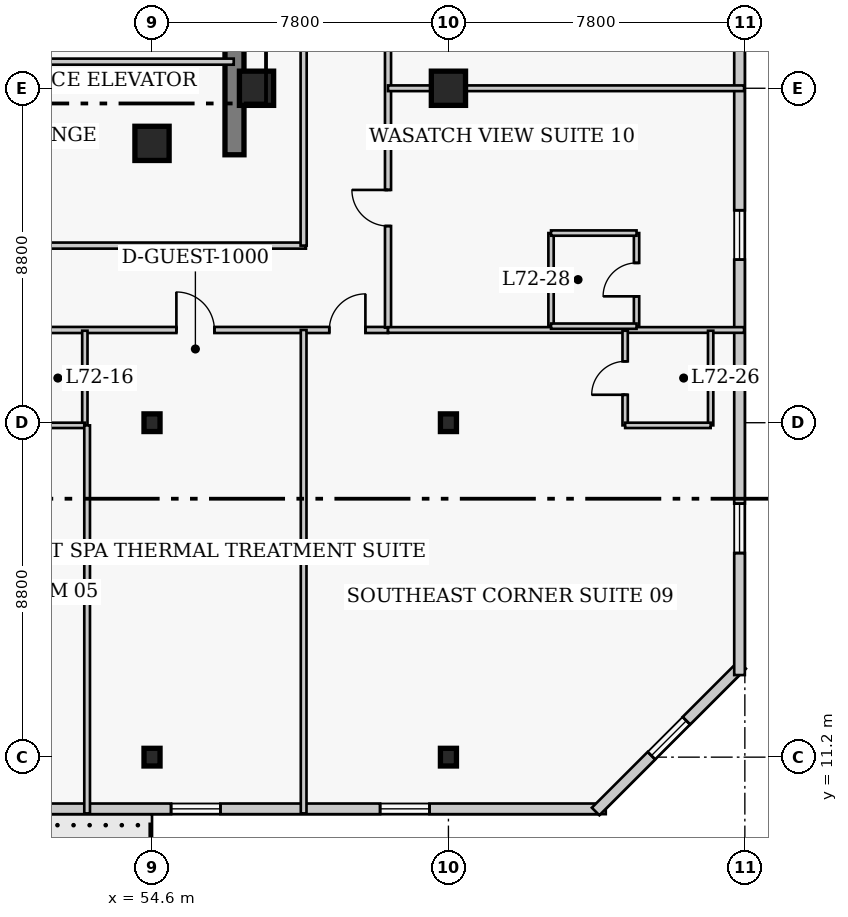
"""IFC4 building model, lengths in metres.
Left out: names, types, materials, properties, quantities, classifications, styles, units other than length and angle.
Written with IfcOpenShell. Run it as: python <this file> out.ifc"""

import sys

from ifc_helpers import new_model, si_unit, direction, frame, frame_2d, origin, origin_2d, place, context, subcontext, project, spatial, rectangle, i_section, extrude, element, fill, save


model = new_model("IFC4")
c1 = context("Model", 3, precision=1e-05, world=origin(), true_north=direction((0.0, 1.0)))
c2 = subcontext(c1, "Body", "Model", "MODEL_VIEW")
j1 = project(units=[si_unit("LENGTHUNIT", "METRE"), si_unit("PLANEANGLEUNIT", "RADIAN")], contexts=[c1])
p1 = place(None, origin())
s1 = spatial("IfcSite", under=j1, at=p1, CompositionType="ELEMENT")
p2 = place(p1, origin())
s2 = spatial("IfcBuilding", under=s1, at=p2, CompositionType="ELEMENT")
p3 = place(p2, frame((0.0, 0.0, 289.4)))
s3 = spatial("IfcBuildingStorey", under=s2, at=p3, CompositionType="ELEMENT", Elevation=289.4)
p4 = place(p3, frame((56.77, 27.05, 0.0), z_axis=(0.0, 0.0, 1.0), x_axis=(0.0, 1.0, 0.0)))
e1 = element("IfcWall", 1, at=p4, inside=s3, PredefinedType="SHEAR", context=c2, shape_type="SweptSolid", body=[
    extrude(rectangle(XDim=13.52, YDim=0.5, at=frame_2d((6.76, 0.0))), origin(), (0.0, 0.0, 1.0), 4.0),
])
for number, where, z_axis, x_axis in (
    (2, (54.6, 11.2, 0.0), (0.0, 0.0, 1.0), (1.0, 0.0, 0.0)),
    (3, (54.6, 20.0, 0.0), (0.0, 0.0, 1.0), (1.0, 0.0, 0.0)),
    (4, (62.4, 11.2, 0.0), (0.0, 0.0, 1.0), (1.0, 0.0, 0.0)),
    (5, (62.4, 20.0, 0.0), (0.0, 0.0, 1.0), (1.0, 0.0, 0.0)),
):
    element("IfcColumn", number, at=place(p3, frame(where, z_axis=z_axis, x_axis=x_axis)), inside=s3, PredefinedType="COLUMN", context=c2, shape_type="SweptSolid", body=[
        extrude(i_section(OverallWidth=0.422, OverallDepth=0.465, WebThickness=0.045, FlangeThickness=0.073, FilletRadius=0.017, at=origin_2d()), origin(), (0.0, 0.0, 1.0), 4.0),
    ])
for number, where, z_axis, x_axis in (
    (6, (62.4, 28.8, 0.0), (0.0, 0.0, 1.0), (1.0, 0.0, 0.0)),
    (7, (57.35, 28.8, 0.0), (0.0, 0.0, 1.0), (1.0, 0.0, 0.0)),
    (8, (54.6, 27.35, 0.0), (0.0, 0.0, 1.0), (1.0, 0.0, 0.0)),
):
    element("IfcColumn", number, at=place(p3, frame(where, z_axis=z_axis, x_axis=x_axis)), inside=s3, PredefinedType="COLUMN", context=c2, shape_type="SweptSolid", body=[
        extrude(rectangle(XDim=0.9, YDim=0.9, at=origin_2d()), origin(), (0.0, 0.0, 1.0), 4.0),
    ])
p5 = place(p3, frame((41.71, 9.84, 0.0), z_axis=(0.0, 0.0, 1.0), x_axis=(1.0, 0.0, 0.0)))
e9 = element("IfcWall", 9, at=p5, inside=s3, PredefinedType="SOLIDWALL", context=c2, shape_type="SweptSolid", body=[
    extrude(rectangle(XDim=24.83, YDim=0.28, at=frame_2d((12.415, 0.0))), origin(), (0.0, 0.0, 1.0), 3.76),
])
p6 = place(p5, frame((8.29, 0.0, 0.0)))
e10 = element("IfcOpeningElement", 10, at=p6, cuts=e9, PredefinedType="OPENING", context=c2, shape_type="SweptSolid", body=[
    extrude(rectangle(XDim=1.4, YDim=2.15, at=frame_2d((0.7, 1.075))), frame((0.0, 0.15, 0.0), z_axis=(0.0, -1.0, 0.0), x_axis=(1.0, 0.0, 0.0)), (0.0, 0.0, 1.0), 0.3),
])
p7 = place(p5, frame((3.488, 0.0, 0.85)))
e11 = element("IfcOpeningElement", 11, at=p7, cuts=e9, PredefinedType="OPENING", context=c2, shape_type="SweptSolid", body=[
    extrude(rectangle(XDim=1.3, YDim=1.7, at=frame_2d((0.65, 0.85))), frame((0.0, 0.15, 0.0), z_axis=(0.0, -1.0, 0.0), x_axis=(1.0, 0.0, 0.0)), (0.0, 0.0, 1.0), 0.3),
])
p8 = place(p5, frame((18.892, 0.0, 0.85)))
e12 = element("IfcOpeningElement", 12, at=p8, cuts=e9, PredefinedType="OPENING", context=c2, shape_type="SweptSolid", body=[
    extrude(rectangle(XDim=1.3, YDim=1.7, at=frame_2d((0.65, 0.85))), frame((0.0, 0.15, 0.0), z_axis=(0.0, -1.0, 0.0), x_axis=(1.0, 0.0, 0.0)), (0.0, 0.0, 1.0), 0.3),
])
p9 = place(p5, frame((13.391, 0.0, 0.85)))
e13 = element("IfcOpeningElement", 13, at=p9, cuts=e9, PredefinedType="OPENING", context=c2, shape_type="SweptSolid", body=[
    extrude(rectangle(XDim=1.3, YDim=1.7, at=frame_2d((0.65, 0.85))), frame((0.0, 0.15, 0.0), z_axis=(0.0, -1.0, 0.0), x_axis=(1.0, 0.0, 0.0)), (0.0, 0.0, 1.0), 0.3),
])
p10 = place(p3, frame((66.273, 9.771, 0.0), z_axis=(0.0, 0.0, 1.0), x_axis=(0.707129162587, 0.707084399077, 0.0)))
e14 = element("IfcWall", 14, at=p10, inside=s3, PredefinedType="SOLIDWALL", context=c2, shape_type="SweptSolid", body=[
    extrude(rectangle(XDim=5.454, YDim=0.28, at=frame_2d((2.727, 0.0))), origin(), (0.0, 0.0, 1.0), 3.76),
])
p11 = place(p10, frame((2.077, 0.0, 0.85)))
e15 = element("IfcOpeningElement", 15, at=p11, cuts=e14, PredefinedType="OPENING", context=c2, shape_type="SweptSolid", body=[
    extrude(rectangle(XDim=1.3, YDim=1.7, at=frame_2d((0.65, 0.85))), frame((0.0, 0.15, 0.0), z_axis=(0.0, -1.0, 0.0), x_axis=(1.0, 0.0, 0.0)), (0.0, 0.0, 1.0), 0.3),
])
p12 = place(p3, frame((70.06, 13.36, 0.0), z_axis=(0.0, 0.0, 1.0), x_axis=(0.0, 1.0, 0.0)))
e16 = element("IfcWall", 16, at=p12, inside=s3, PredefinedType="SOLIDWALL", context=c2, shape_type="SweptSolid", body=[
    extrude(rectangle(XDim=30.88, YDim=0.28, at=frame_2d((15.44, 0.0))), origin(), (0.0, 0.0, 1.0), 3.76),
])
p13 = place(p12, frame((3.21, 0.0, 0.85)))
e17 = element("IfcOpeningElement", 17, at=p13, cuts=e16, PredefinedType="OPENING", context=c2, shape_type="SweptSolid", body=[
    extrude(rectangle(XDim=1.3, YDim=1.7, at=frame_2d((0.65, 0.85))), frame((0.0, 0.15, 0.0), z_axis=(0.0, -1.0, 0.0), x_axis=(1.0, 0.0, 0.0)), (0.0, 0.0, 1.0), 0.3),
])
p14 = place(p12, frame((10.93, 0.0, 0.85)))
e18 = element("IfcOpeningElement", 18, at=p14, cuts=e16, PredefinedType="OPENING", context=c2, shape_type="SweptSolid", body=[
    extrude(rectangle(XDim=1.3, YDim=1.7, at=frame_2d((0.65, 0.85))), frame((0.0, 0.15, 0.0), z_axis=(0.0, -1.0, 0.0), x_axis=(1.0, 0.0, 0.0)), (0.0, 0.0, 1.0), 0.3),
])
p15 = place(p12, frame((18.65, 0.0, 0.85)))
e19 = element("IfcOpeningElement", 19, at=p15, cuts=e16, PredefinedType="OPENING", context=c2, shape_type="SweptSolid", body=[
    extrude(rectangle(XDim=1.3, YDim=1.7, at=frame_2d((0.65, 0.85))), frame((0.0, 0.15, 0.0), z_axis=(0.0, -1.0, 0.0), x_axis=(1.0, 0.0, 0.0)), (0.0, 0.0, 1.0), 0.3),
])
p16 = place(p12, frame((26.37, 0.0, 0.85)))
e20 = element("IfcOpeningElement", 20, at=p16, cuts=e16, PredefinedType="OPENING", context=c2, shape_type="SweptSolid", body=[
    extrude(rectangle(XDim=1.3, YDim=1.7, at=frame_2d((0.65, 0.85))), frame((0.0, 0.15, 0.0), z_axis=(0.0, -1.0, 0.0), x_axis=(1.0, 0.0, 0.0)), (0.0, 0.0, 1.0), 0.3),
])
p17 = place(p3, frame((51.12, 29.5, 0.0), z_axis=(0.0, 0.0, 1.0), x_axis=(1.0, 0.0, 0.0)))
e21 = element("IfcWall", 21, at=p17, inside=s3, PredefinedType="PARTITIONING", context=c2, shape_type="SweptSolid", body=[
    extrude(rectangle(XDim=5.63, YDim=0.16, at=frame_2d((2.815, 0.0))), origin(), (0.0, 0.0, 1.0), 3.76),
])
p18 = place(p3, frame((35.85, 24.66, 0.0), z_axis=(0.0, 0.0, 1.0), x_axis=(1.0, 0.0, 0.0)))
e22 = element("IfcWall", 22, at=p18, inside=s3, PredefinedType="PARTITIONING", context=c2, shape_type="SweptSolid", body=[
    extrude(rectangle(XDim=22.8, YDim=0.16, at=frame_2d((11.4, 0.0))), origin(), (0.0, 0.0, 1.0), 3.76),
])
p19 = place(p18, frame((5.35, 0.0, 0.0)))
e23 = element("IfcOpeningElement", 23, at=p19, cuts=e22, PredefinedType="OPENING", context=c2, shape_type="SweptSolid", body=[
    extrude(rectangle(XDim=1.0, YDim=2.15, at=frame_2d((0.5, 1.075))), frame((0.0, 0.09, 0.0), z_axis=(0.0, -1.0, 0.0), x_axis=(1.0, 0.0, 0.0)), (0.0, 0.0, 1.0), 0.18),
])
p20 = place(p18, frame((12.85, 0.0, 0.0)))
e24 = element("IfcOpeningElement", 24, at=p20, cuts=e22, PredefinedType="OPENING", context=c2, shape_type="SweptSolid", body=[
    extrude(rectangle(XDim=1.0, YDim=2.15, at=frame_2d((0.5, 1.075))), frame((0.0, 0.09, 0.0), z_axis=(0.0, -1.0, 0.0), x_axis=(1.0, 0.0, 0.0)), (0.0, 0.0, 1.0), 0.18),
])
p21 = place(p3, frame((35.8, 22.44, 0.0), z_axis=(0.0, 0.0, 1.0), x_axis=(1.0, 0.0, 0.0)))
e25 = element("IfcWall", 25, at=p21, inside=s3, PredefinedType="PARTITIONING", context=c2, shape_type="SweptSolid", body=[
    extrude(rectangle(XDim=25.01, YDim=0.16, at=frame_2d((12.505, 0.0))), origin(), (0.0, 0.0, 1.0), 3.76),
])
p22 = place(p21, frame((0.924, 0.0, 0.0)))
e26 = element("IfcOpeningElement", 26, at=p22, cuts=e25, PredefinedType="OPENING", context=c2, shape_type="SweptSolid", body=[
    extrude(rectangle(XDim=0.95, YDim=2.1, at=frame_2d((0.475, 1.05))), frame((0.0, 0.09, 0.0), z_axis=(0.0, -1.0, 0.0), x_axis=(1.0, 0.0, 0.0)), (0.0, 0.0, 1.0), 0.18),
])
p23 = place(p21, frame((9.226, 0.0, 0.0)))
e27 = element("IfcOpeningElement", 27, at=p23, cuts=e25, PredefinedType="OPENING", context=c2, shape_type="SweptSolid", body=[
    extrude(rectangle(XDim=0.95, YDim=2.1, at=frame_2d((0.475, 1.05))), frame((0.0, 0.09, 0.0), z_axis=(0.0, -1.0, 0.0), x_axis=(1.0, 0.0, 0.0)), (0.0, 0.0, 1.0), 0.18),
])
p24 = place(p21, frame((12.614, 0.0, 0.0)))
e28 = element("IfcOpeningElement", 28, at=p24, cuts=e25, PredefinedType="OPENING", context=c2, shape_type="SweptSolid", body=[
    extrude(rectangle(XDim=0.95, YDim=2.1, at=frame_2d((0.475, 1.05))), frame((0.0, 0.09, 0.0), z_axis=(0.0, -1.0, 0.0), x_axis=(1.0, 0.0, 0.0)), (0.0, 0.0, 1.0), 0.18),
])
p25 = place(p21, frame((19.441, 0.0, 0.0)))
e29 = element("IfcOpeningElement", 29, at=p25, cuts=e25, PredefinedType="OPENING", context=c2, shape_type="SweptSolid", body=[
    extrude(rectangle(XDim=1.0, YDim=2.15, at=frame_2d((0.5, 1.075))), frame((0.0, 0.09, 0.0), z_axis=(0.0, -1.0, 0.0), x_axis=(1.0, 0.0, 0.0)), (0.0, 0.0, 1.0), 0.18),
])
p26 = place(p21, frame((23.465, 0.0, 0.0)))
e30 = element("IfcOpeningElement", 30, at=p26, cuts=e25, PredefinedType="OPENING", context=c2, shape_type="SweptSolid", body=[
    extrude(rectangle(XDim=0.95, YDim=2.1, at=frame_2d((0.475, 1.05))), frame((0.0, 0.09, 0.0), z_axis=(0.0, -1.0, 0.0), x_axis=(1.0, 0.0, 0.0)), (0.0, 0.0, 1.0), 0.18),
])
p27 = place(p3, frame((60.81, 22.5, 0.0), z_axis=(0.0, 0.0, 1.0), x_axis=(0.0, 1.0, 0.0)))
e31 = element("IfcWall", 31, at=p27, inside=s3, PredefinedType="PARTITIONING", context=c2, shape_type="SweptSolid", body=[
    extrude(rectangle(XDim=18.15, YDim=0.16, at=frame_2d((9.075, 0.0))), origin(), (0.0, 0.0, 1.0), 3.76),
])
p28 = place(p27, frame((2.675, 0.0, 0.0)))
e32 = element("IfcOpeningElement", 32, at=p28, cuts=e31, PredefinedType="OPENING", context=c2, shape_type="SweptSolid", body=[
    extrude(rectangle(XDim=0.95, YDim=2.1, at=frame_2d((0.475, 1.05))), frame((0.0, 0.09, 0.0), z_axis=(0.0, -1.0, 0.0), x_axis=(1.0, 0.0, 0.0)), (0.0, 0.0, 1.0), 0.18),
])
p29 = place(p27, frame((9.875, 0.0, 0.0)))
e33 = element("IfcOpeningElement", 33, at=p29, cuts=e31, PredefinedType="OPENING", context=c2, shape_type="SweptSolid", body=[
    extrude(rectangle(XDim=0.95, YDim=2.1, at=frame_2d((0.475, 1.05))), frame((0.0, 0.09, 0.0), z_axis=(0.0, -1.0, 0.0), x_axis=(1.0, 0.0, 0.0)), (0.0, 0.0, 1.0), 0.18),
])
p30 = place(p27, frame((16.71, 0.0, 0.0)))
e34 = element("IfcOpeningElement", 34, at=p30, cuts=e31, PredefinedType="OPENING", context=c2, shape_type="SweptSolid", body=[
    extrude(rectangle(XDim=1.0, YDim=2.15, at=frame_2d((0.5, 1.075))), frame((0.0, 0.09, 0.0), z_axis=(0.0, -1.0, 0.0), x_axis=(1.0, 0.0, 0.0)), (0.0, 0.0, 1.0), 0.18),
])
p31 = place(p3, frame((58.59, 24.66, 0.0), z_axis=(0.0, 0.0, 1.0), x_axis=(0.0, 1.0, 0.0)))
e35 = element("IfcWall", 35, at=p31, inside=s3, PredefinedType="PARTITIONING", context=c2, shape_type="SweptSolid", body=[
    extrude(rectangle(XDim=15.99, YDim=0.16, at=frame_2d((7.995, 0.0))), origin(), (0.0, 0.0, 1.0), 3.76),
])
p32 = place(p3, frame((52.833, 19.93, 0.0), z_axis=(0.0, 0.0, 1.0), x_axis=(0.0, 1.0, 0.0)))
e36 = element("IfcWall", 36, at=p32, inside=s3, PredefinedType="PLUMBINGWALL", context=c2, shape_type="SweptSolid", body=[
    extrude(rectangle(XDim=2.49, YDim=0.14, at=frame_2d((1.245, 0.0))), origin(), (0.0, 0.0, 1.0), 3.76),
])
p33 = place(p3, frame((50.583, 19.93, 0.0), z_axis=(0.0, 0.0, 1.0), x_axis=(1.0, 0.0, 0.0)))
e37 = element("IfcWall", 37, at=p33, inside=s3, PredefinedType="PLUMBINGWALL", context=c2, shape_type="SweptSolid", body=[
    extrude(rectangle(XDim=2.25, YDim=0.14, at=frame_2d((1.125, 0.0))), origin(), (0.0, 0.0, 1.0), 3.064),
])
p34 = place(p3, frame((52.893, 9.72, 0.0), z_axis=(0.0, 0.0, 1.0), x_axis=(0.0, 1.0, 0.0)))
e38 = element("IfcWall", 38, at=p34, inside=s3, PredefinedType="PARTITIONING", context=c2, shape_type="SweptSolid", body=[
    extrude(rectangle(XDim=10.21, YDim=0.15, at=frame_2d((5.105, 0.0))), origin(), (0.0, 0.0, 1.0), 3.76),
])
p35 = place(p3, frame((58.59, 9.72, 0.0), z_axis=(0.0, 0.0, 1.0), x_axis=(0.0, 1.0, 0.0)))
e39 = element("IfcWall", 39, at=p35, inside=s3, PredefinedType="PARTITIONING", context=c2, shape_type="SweptSolid", body=[
    extrude(rectangle(XDim=12.72, YDim=0.15, at=frame_2d((6.36, 0.0))), origin(), (0.0, 0.0, 1.0), 3.356),
])
p36 = place(p3, frame((60.81, 22.44, 0.0), z_axis=(0.0, 0.0, 1.0), x_axis=(1.0, 0.0, 0.0)))
e40 = element("IfcWall", 40, at=p36, inside=s3, PredefinedType="PARTITIONING", context=c2, shape_type="SweptSolid", body=[
    extrude(rectangle(XDim=9.37, YDim=0.15, at=frame_2d((4.685, 0.0))), origin(), (0.0, 0.0, 1.0), 3.76),
])
p37 = place(p3, frame((67.05, 19.93, 0.0), z_axis=(0.0, 0.0, 1.0), x_axis=(0.0, 1.0, 0.0)))
e41 = element("IfcWall", 41, at=p37, inside=s3, PredefinedType="PLUMBINGWALL", context=c2, shape_type="SweptSolid", body=[
    extrude(rectangle(XDim=2.49, YDim=0.14, at=frame_2d((1.245, 0.0))), origin(), (0.0, 0.0, 1.0), 3.76),
])
p38 = place(p37, frame((0.805, 0.0, 0.0)))
e42 = element("IfcOpeningElement", 42, at=p38, cuts=e41, PredefinedType="OPENING", context=c2, shape_type="SweptSolid", body=[
    extrude(rectangle(XDim=0.88, YDim=2.05, at=frame_2d((0.44, 1.025))), frame((0.0, 0.08, 0.0), z_axis=(0.0, -1.0, 0.0), x_axis=(1.0, 0.0, 0.0)), (0.0, 0.0, 1.0), 0.16),
])
p39 = place(p3, frame((69.3, 19.93, 0.0), z_axis=(0.0, 0.0, 1.0), x_axis=(0.0, 1.0, 0.0)))
e43 = element("IfcWall", 43, at=p39, inside=s3, PredefinedType="PLUMBINGWALL", context=c2, shape_type="SweptSolid", body=[
    extrude(rectangle(XDim=2.49, YDim=0.14, at=frame_2d((1.245, 0.0))), origin(), (0.0, 0.0, 1.0), 3.76),
])
p40 = place(p3, frame((67.05, 19.93, 0.0), z_axis=(0.0, 0.0, 1.0), x_axis=(1.0, 0.0, 0.0)))
e44 = element("IfcWall", 44, at=p40, inside=s3, PredefinedType="PLUMBINGWALL", context=c2, shape_type="SweptSolid", body=[
    extrude(rectangle(XDim=2.25, YDim=0.14, at=frame_2d((1.125, 0.0))), origin(), (0.0, 0.0, 1.0), 3.76),
])
p41 = place(p3, frame((65.1, 22.54, 0.0), z_axis=(0.0, 0.0, 1.0), x_axis=(0.0, 1.0, 0.0)))
e45 = element("IfcWall", 45, at=p41, inside=s3, PredefinedType="PLUMBINGWALL", context=c2, shape_type="SweptSolid", body=[
    extrude(rectangle(XDim=2.45, YDim=0.14, at=frame_2d((1.225, 0.0))), origin(), (0.0, 0.0, 1.0), 3.76),
])
p42 = place(p3, frame((67.35, 22.54, 0.0), z_axis=(0.0, 0.0, 1.0), x_axis=(0.0, 1.0, 0.0)))
e46 = element("IfcWall", 46, at=p42, inside=s3, PredefinedType="PLUMBINGWALL", context=c2, shape_type="SweptSolid", body=[
    extrude(rectangle(XDim=2.45, YDim=0.14, at=frame_2d((1.225, 0.0))), origin(), (0.0, 0.0, 1.0), 3.76),
])
p43 = place(p42, frame((0.785, 0.0, 0.0)))
e47 = element("IfcOpeningElement", 47, at=p43, cuts=e46, PredefinedType="OPENING", context=c2, shape_type="SweptSolid", body=[
    extrude(rectangle(XDim=0.88, YDim=2.05, at=frame_2d((0.44, 1.025))), frame((0.0, 0.08, 0.0), z_axis=(0.0, -1.0, 0.0), x_axis=(1.0, 0.0, 0.0)), (0.0, 0.0, 1.0), 0.16),
])
for number, where, z_axis, x_axis in (
    (48, (65.1, 22.54, 0.0), (0.0, 0.0, 1.0), (1.0, 0.0, 0.0)),
    (49, (65.1, 24.99, 0.0), (0.0, 0.0, 1.0), (1.0, 0.0, 0.0)),
):
    element("IfcWall", number, at=place(p3, frame(where, z_axis=z_axis, x_axis=x_axis)), inside=s3, PredefinedType="PLUMBINGWALL", context=c2, shape_type="SweptSolid", body=[
        extrude(rectangle(XDim=2.25, YDim=0.14, at=frame_2d((1.125, 0.0))), origin(), (0.0, 0.0, 1.0), 3.76),
    ])
p44 = place(p3, frame((60.81, 28.8, 0.0), z_axis=(0.0, 0.0, 1.0), x_axis=(1.0, 0.0, 0.0)))
e50 = element("IfcWall", 50, at=p44, inside=s3, PredefinedType="PARTITIONING", context=c2, shape_type="SweptSolid", body=[
    extrude(rectangle(XDim=9.37, YDim=0.15, at=frame_2d((4.685, 0.0))), origin(), (0.0, 0.0, 1.0), 3.064),
])
p45 = place(p8, origin())
e51 = element("IfcWindow", 51, at=p45, inside=s3, PartitioningType="SINGLE_PANEL", PredefinedType="WINDOW", context=c2, shape_type="SweptSolid", body=[
    extrude(rectangle(XDim=1.3, YDim=1.7, at=frame_2d((0.65, 0.85))), frame((0.0, 0.03, 0.0), z_axis=(0.0, -1.0, 0.0), x_axis=(1.0, 0.0, 0.0)), (0.0, 0.0, 1.0), 0.06),
])
fill(e12, e51)
p46 = place(p11, origin())
e52 = element("IfcWindow", 52, at=p46, inside=s3, PartitioningType="SINGLE_PANEL", PredefinedType="WINDOW", context=c2, shape_type="SweptSolid", body=[
    extrude(rectangle(XDim=1.3, YDim=1.7, at=frame_2d((0.65, 0.85))), frame((0.0, 0.03, 0.0), z_axis=(0.0, -1.0, 0.0), x_axis=(1.0, 0.0, 0.0)), (0.0, 0.0, 1.0), 0.06),
])
fill(e15, e52)
p47 = place(p13, origin())
e53 = element("IfcWindow", 53, at=p47, inside=s3, PartitioningType="SINGLE_PANEL", PredefinedType="WINDOW", context=c2, shape_type="SweptSolid", body=[
    extrude(rectangle(XDim=1.3, YDim=1.7, at=frame_2d((0.65, 0.85))), frame((0.0, 0.03, 0.0), z_axis=(0.0, -1.0, 0.0), x_axis=(1.0, 0.0, 0.0)), (0.0, 0.0, 1.0), 0.06),
])
fill(e17, e53)
p48 = place(p14, origin())
e54 = element("IfcWindow", 54, at=p48, inside=s3, PartitioningType="SINGLE_PANEL", PredefinedType="WINDOW", context=c2, shape_type="SweptSolid", body=[
    extrude(rectangle(XDim=1.3, YDim=1.7, at=frame_2d((0.65, 0.85))), frame((0.0, 0.03, 0.0), z_axis=(0.0, -1.0, 0.0), x_axis=(1.0, 0.0, 0.0)), (0.0, 0.0, 1.0), 0.06),
])
fill(e18, e54)
p49 = place(p9, origin())
e55 = element("IfcWindow", 55, at=p49, inside=s3, PartitioningType="SINGLE_PANEL", PredefinedType="WINDOW", context=c2, shape_type="SweptSolid", body=[
    extrude(rectangle(XDim=1.3, YDim=1.7, at=frame_2d((0.65, 0.85))), frame((0.0, 0.03, 0.0), z_axis=(0.0, -1.0, 0.0), x_axis=(1.0, 0.0, 0.0)), (0.0, 0.0, 1.0), 0.06),
])
fill(e13, e55)
p50 = place(p25, origin())
e56 = element("IfcDoor", 56, at=p50, inside=s3, OperationType="SINGLE_SWING_LEFT", PredefinedType="DOOR", context=c2, shape_type="SweptSolid", body=[
    extrude(rectangle(XDim=1.0, YDim=2.15, at=frame_2d((0.5, 1.075))), frame((0.0, 0.025, 0.0), z_axis=(0.0, -1.0, 0.0), x_axis=(1.0, 0.0, 0.0)), (0.0, 0.0, 1.0), 0.05),
])
fill(e29, e56)
p51 = place(p38, origin())
e57 = element("IfcDoor", 57, at=p51, inside=s3, OperationType="SINGLE_SWING_LEFT", PredefinedType="DOOR", context=c2, shape_type="SweptSolid", body=[
    extrude(rectangle(XDim=0.88, YDim=2.05, at=frame_2d((0.44, 1.025))), frame((0.0, 0.025, 0.0), z_axis=(0.0, -1.0, 0.0), x_axis=(1.0, 0.0, 0.0)), (0.0, 0.0, 1.0), 0.05),
])
fill(e42, e57)
p52 = place(p26, origin())
e58 = element("IfcDoor", 58, at=p52, inside=s3, OperationType="SINGLE_SWING_RIGHT", PredefinedType="DOOR", context=c2, shape_type="SweptSolid", body=[
    extrude(rectangle(XDim=0.95, YDim=2.1, at=frame_2d((0.475, 1.05))), frame((0.0, 0.025, 0.0), z_axis=(0.0, -1.0, 0.0), x_axis=(1.0, 0.0, 0.0)), (0.0, 0.0, 1.0), 0.05),
])
fill(e30, e58)
p53 = place(p43, origin())
e59 = element("IfcDoor", 59, at=p53, inside=s3, OperationType="SINGLE_SWING_LEFT", PredefinedType="DOOR", context=c2, shape_type="SweptSolid", body=[
    extrude(rectangle(XDim=0.88, YDim=2.05, at=frame_2d((0.44, 1.025))), frame((0.0, 0.025, 0.0), z_axis=(0.0, -1.0, 0.0), x_axis=(1.0, 0.0, 0.0)), (0.0, 0.0, 1.0), 0.05),
])
fill(e47, e59)
p54 = place(p28, origin())
e60 = element("IfcDoor", 60, at=p54, inside=s3, OperationType="SINGLE_SWING_RIGHT", PredefinedType="DOOR", context=c2, shape_type="SweptSolid", body=[
    extrude(rectangle(XDim=0.95, YDim=2.1, at=frame_2d((0.475, 1.05))), frame((0.0, 0.025, 0.0), z_axis=(0.0, -1.0, 0.0), x_axis=(1.0, 0.0, 0.0)), (0.0, 0.0, 1.0), 0.05),
])
fill(e32, e60)
save(model, sys.argv[1])
